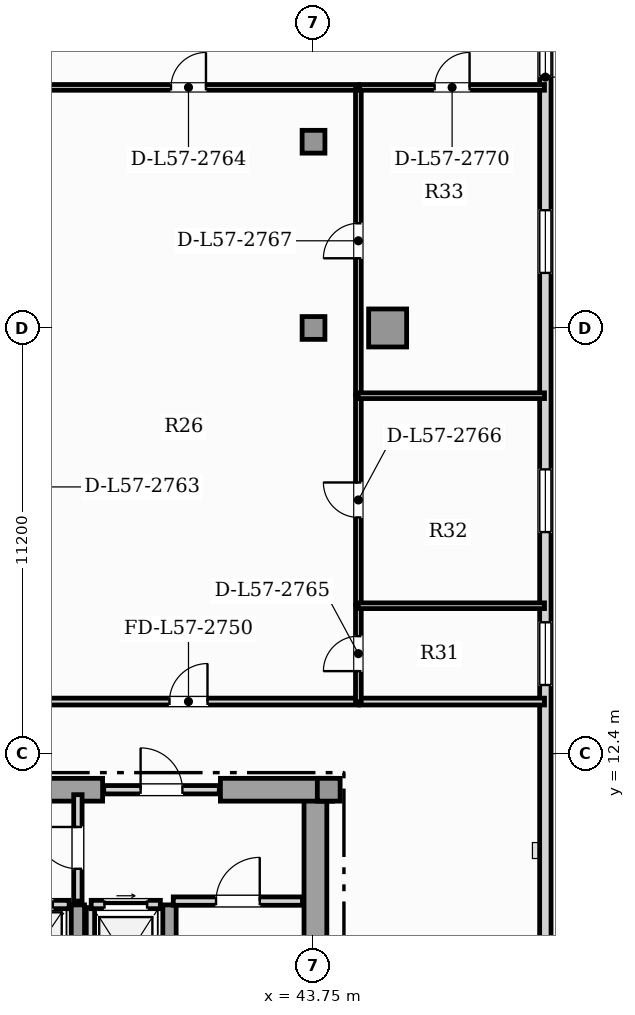
"""IFC4 building model, lengths in metres.
Left out: names, types, materials, properties, quantities, classifications, styles, units other than length and angle.
Written with IfcOpenShell. Run it as: python <this file> out.ifc"""

import sys

from ifc_helpers import new_model, si_unit, direction, frame, frame_2d, origin, origin_2d, place, context, subcontext, project, spatial, rectangle, hollow_rectangle, extrude, element, fill, save


model = new_model("IFC4")
c1 = context("Model", 3, precision=1e-05, world=origin(), true_north=direction((0.0, 1.0)))
c2 = subcontext(c1, "Body", "Model", "MODEL_VIEW")
j1 = project(units=[si_unit("LENGTHUNIT", "METRE"), si_unit("PLANEANGLEUNIT", "RADIAN")], contexts=[c1])
p1 = place(None, origin())
s1 = spatial("IfcSite", under=j1, at=p1, CompositionType="ELEMENT")
p2 = place(p1, origin())
s2 = spatial("IfcBuilding", under=s1, at=p2, CompositionType="ELEMENT")
p3 = place(p2, frame((0.0, 0.0, 231.1)))
s3 = spatial("IfcBuildingStorey", under=s2, at=p3, CompositionType="ELEMENT", Elevation=231.1)
p4 = place(p3, frame((43.8, 0.92, 0.0), z_axis=(0.0, 0.0, 1.0), x_axis=(0.0, 1.0, 0.0)))
e1 = element("IfcWall", 1, at=p4, inside=s3, PredefinedType="SHEAR", context=c2, shape_type="SweptSolid", body=[
    extrude(rectangle(XDim=10.53, YDim=0.6, at=frame_2d((5.265, 0.0))), origin(), (0.0, 0.0, 1.0), 3.63),
])
p5 = place(p3, frame((30.9, 11.45, 0.0), z_axis=(0.0, 0.0, 1.0), x_axis=(1.0, 0.0, 0.0)))
e2 = element("IfcWall", 2, at=p5, inside=s3, PredefinedType="SHEAR", context=c2, shape_type="SweptSolid", body=[
    extrude(rectangle(XDim=7.3, YDim=0.6, at=frame_2d((3.65, 0.0))), origin(), (0.0, 0.0, 1.0), 3.63),
])
p6 = place(p3, frame((41.3, 11.45, 0.0), z_axis=(0.0, 0.0, 1.0), x_axis=(1.0, 0.0, 0.0)))
e3 = element("IfcWall", 3, at=p6, inside=s3, PredefinedType="SHEAR", context=c2, shape_type="SweptSolid", body=[
    extrude(rectangle(XDim=2.95, YDim=0.6, at=frame_2d((1.475, 0.0))), origin(), (0.0, 0.0, 1.0), 3.63),
])
for number, where, z_axis, x_axis in (
    (4, (37.55, 0.92, 0.0), (0.0, 0.0, 1.0), (0.0, 1.0, 0.0)),
    (5, (39.96, 0.92, 0.0), (0.0, 0.0, 1.0), (0.0, 1.0, 0.0)),
):
    element("IfcWall", number, at=place(p3, frame(where, z_axis=z_axis, x_axis=x_axis)), inside=s3, PredefinedType="SHEAR", context=c2, shape_type="SweptSolid", body=[
        extrude(rectangle(XDim=7.5, YDim=0.35, at=frame_2d((3.75, 0.0))), origin(), (0.0, 0.0, 1.0), 3.63),
    ])
p7 = place(p3, frame((44.15, 11.45, 0.0), z_axis=(0.0, 0.0, 1.0), x_axis=(1.0, 0.0, 0.0)))
e6 = element("IfcColumn", 6, at=p7, inside=s3, PredefinedType="COLUMN", context=c2, shape_type="SweptSolid", body=[
    extrude(rectangle(XDim=0.6, YDim=0.6, at=origin_2d()), origin(), (0.0, 0.0, 1.0), 3.85),
])
p8 = place(p3, frame((45.7, 23.6, 0.0), z_axis=(0.0, 0.0, 1.0), x_axis=(1.0, 0.0, 0.0)))
e7 = element("IfcColumn", 7, at=p8, inside=s3, PredefinedType="USERDEFINED", context=c2, shape_type="SweptSolid", body=[
    extrude(hollow_rectangle(XDim=1.0, YDim=1.0, WallThickness=0.06, at=origin_2d()), origin(), (0.0, 0.0, 1.0), 3.85),
])
for number, where, z_axis, x_axis in (
    (8, (43.75, 23.6, 0.0), (0.0, 0.0, 1.0), (1.0, 0.0, 0.0)),
    (9, (43.75, 28.5, 0.0), (0.0, 0.0, 1.0), (1.0, 0.0, 0.0)),
):
    element("IfcColumn", number, at=place(p3, frame(where, z_axis=z_axis, x_axis=x_axis)), inside=s3, PredefinedType="COLUMN", context=c2, shape_type="SweptSolid", body=[
        extrude(rectangle(XDim=0.6, YDim=0.6, at=origin_2d()), origin(), (0.0, 0.0, 1.0), 3.85),
    ])
p9 = place(p3, frame((49.85, 3.24, 0.0), z_axis=(0.0, 0.0, 1.0), x_axis=(0.0, 1.0, 0.0)))
e10 = element("IfcWall", 10, at=p9, inside=s3, PredefinedType="SOLIDWALL", context=c2, shape_type="SweptSolid", body=[
    extrude(rectangle(XDim=30.72, YDim=0.3, at=frame_2d((15.36, 0.0))), origin(), (0.0, 0.0, 1.0), 3.63),
])
p10 = place(p9, frame((26.99, 0.0, 0.95)))
e11 = element("IfcOpeningElement", 11, at=p10, cuts=e10, PredefinedType="OPENING", context=c2, shape_type="SweptSolid", body=[
    extrude(rectangle(XDim=0.9, YDim=1.5, at=frame_2d((0.45, 0.75))), frame((0.0, 0.16, 0.0), z_axis=(0.0, -1.0, 0.0), x_axis=(1.0, 0.0, 0.0)), (0.0, 0.0, 1.0), 0.32),
])
p11 = place(p9, frame((10.966, 0.0, 0.88)))
e12 = element("IfcOpeningElement", 12, at=p11, cuts=e10, PredefinedType="OPENING", context=c2, shape_type="SweptSolid", body=[
    extrude(rectangle(XDim=1.65, YDim=2.0, at=frame_2d((0.825, 1.0))), frame((0.0, 0.16, 0.0), z_axis=(0.0, -1.0, 0.0), x_axis=(1.0, 0.0, 0.0)), (0.0, 0.0, 1.0), 0.32),
])
p12 = place(p9, frame((14.99, 0.0, 0.88)))
e13 = element("IfcOpeningElement", 13, at=p12, cuts=e10, PredefinedType="OPENING", context=c2, shape_type="SweptSolid", body=[
    extrude(rectangle(XDim=1.65, YDim=2.0, at=frame_2d((0.825, 1.0))), frame((0.0, 0.16, 0.0), z_axis=(0.0, -1.0, 0.0), x_axis=(1.0, 0.0, 0.0)), (0.0, 0.0, 1.0), 0.32),
])
p13 = place(p9, frame((21.809, 0.0, 0.88)))
e14 = element("IfcOpeningElement", 14, at=p13, cuts=e10, PredefinedType="OPENING", context=c2, shape_type="SweptSolid", body=[
    extrude(rectangle(XDim=1.65, YDim=2.0, at=frame_2d((0.825, 1.0))), frame((0.0, 0.16, 0.0), z_axis=(0.0, -1.0, 0.0), x_axis=(1.0, 0.0, 0.0)), (0.0, 0.0, 1.0), 0.32),
])
p14 = place(p9, frame((29.04, 0.0, 0.95)))
e15 = element("IfcOpeningElement", 15, at=p14, cuts=e10, PredefinedType="OPENING", context=c2, shape_type="SweptSolid", body=[
    extrude(rectangle(XDim=0.9, YDim=1.5, at=frame_2d((0.45, 0.75))), frame((0.0, 0.16, 0.0), z_axis=(0.0, -1.0, 0.0), x_axis=(1.0, 0.0, 0.0)), (0.0, 0.0, 1.0), 0.32),
])
p15 = place(p3, frame((37.88, 5.65, 0.0), z_axis=(0.0, 0.0, 1.0), x_axis=(0.0, 1.0, 0.0)))
e16 = element("IfcWall", 16, at=p15, inside=s3, PredefinedType="SOLIDWALL", context=c2, shape_type="SweptSolid", body=[
    extrude(rectangle(XDim=2.7, YDim=0.22, at=frame_2d((1.35, 0.0))), origin(), (0.0, 0.0, 1.0), 3.63),
])
p16 = place(p3, frame((37.9, 8.43, 0.0), z_axis=(0.0, 0.0, 1.0), x_axis=(1.0, 0.0, 0.0)))
e17 = element("IfcWall", 17, at=p16, inside=s3, PredefinedType="SOLIDWALL", context=c2, shape_type="SweptSolid", body=[
    extrude(rectangle(XDim=1.82, YDim=0.22, at=frame_2d((0.91, 0.0))), origin(), (0.0, 0.0, 1.0), 3.63),
])
p17 = place(p16, frame((0.35, 0.0, 0.0)))
e18 = element("IfcOpeningElement", 18, at=p17, cuts=e17, PredefinedType="OPENING", context=c2, shape_type="SweptSolid", body=[
    extrude(rectangle(XDim=1.12, YDim=2.25, at=frame_2d((0.56, 1.125))), frame((0.0, 0.12, 0.0), z_axis=(0.0, -1.0, 0.0), x_axis=(1.0, 0.0, 0.0)), (0.0, 0.0, 1.0), 0.24),
])
p18 = place(p3, frame((35.28, 8.43, 0.0), z_axis=(0.0, 0.0, 1.0), x_axis=(1.0, 0.0, 0.0)))
e19 = element("IfcWall", 19, at=p18, inside=s3, PredefinedType="SOLIDWALL", context=c2, shape_type="SweptSolid", body=[
    extrude(rectangle(XDim=2.04, YDim=0.22, at=frame_2d((1.02, 0.0))), origin(), (0.0, 0.0, 1.0), 3.63),
])
p19 = place(p18, frame((0.43, 0.0, 0.0)))
e20 = element("IfcOpeningElement", 20, at=p19, cuts=e19, PredefinedType="OPENING", context=c2, shape_type="SweptSolid", body=[
    extrude(rectangle(XDim=1.18, YDim=2.2, at=frame_2d((0.59, 1.1))), frame((0.0, 0.12, 0.0), z_axis=(0.0, -1.0, 0.0), x_axis=(1.0, 0.0, 0.0)), (0.0, 0.0, 1.0), 0.24),
])
p20 = place(p3, frame((40.06, 8.52, 0.0), z_axis=(0.0, 0.0, 1.0), x_axis=(1.0, 0.0, 0.0)))
e21 = element("IfcWall", 21, at=p20, inside=s3, PredefinedType="SOLIDWALL", context=c2, shape_type="SweptSolid", body=[
    extrude(rectangle(XDim=3.4, YDim=0.22, at=frame_2d((1.7, 0.0))), origin(), (0.0, 0.0, 1.0), 3.63),
])
p21 = place(p20, frame((1.125, 0.0, 0.0)))
e22 = element("IfcOpeningElement", 22, at=p21, cuts=e21, PredefinedType="OPENING", context=c2, shape_type="SweptSolid", body=[
    extrude(rectangle(XDim=1.15, YDim=2.2, at=frame_2d((0.575, 1.1))), frame((0.0, 0.12, 0.0), z_axis=(0.0, -1.0, 0.0), x_axis=(1.0, 0.0, 0.0)), (0.0, 0.0, 1.0), 0.24),
])
p22 = place(p3, frame((37.55, 8.52, 0.0), z_axis=(0.0, 0.0, 1.0), x_axis=(0.0, 1.0, 0.0)))
e23 = element("IfcWall", 23, at=p22, inside=s3, PredefinedType="SOLIDWALL", context=c2, shape_type="SweptSolid", body=[
    extrude(rectangle(XDim=2.8, YDim=0.22, at=frame_2d((1.4, 0.0))), origin(), (0.0, 0.0, 1.0), 3.085),
])
p23 = place(p22, frame((0.85, 0.0, 0.0)))
e24 = element("IfcOpeningElement", 24, at=p23, cuts=e23, PredefinedType="OPENING", context=c2, shape_type="SweptSolid", body=[
    extrude(rectangle(XDim=1.1, YDim=2.2, at=frame_2d((0.55, 1.1))), frame((0.0, 0.12, 0.0), z_axis=(0.0, -1.0, 0.0), x_axis=(1.0, 0.0, 0.0)), (0.0, 0.0, 1.0), 0.24),
])
p24 = place(p3, frame((38.23, 11.45, 0.0), z_axis=(0.0, 0.0, 1.0), x_axis=(1.0, 0.0, 0.0)))
e25 = element("IfcWall", 25, at=p24, inside=s3, PredefinedType="SOLIDWALL", context=c2, shape_type="SweptSolid", body=[
    extrude(rectangle(XDim=3.04, YDim=0.22, at=frame_2d((1.52, 0.0))), origin(), (0.0, 0.0, 1.0), 3.63),
])
p25 = place(p24, frame((0.97, 0.0, 0.0)))
e26 = element("IfcOpeningElement", 26, at=p25, cuts=e25, PredefinedType="OPENING", context=c2, shape_type="SweptSolid", body=[
    extrude(rectangle(XDim=1.1, YDim=2.2, at=frame_2d((0.55, 1.1))), frame((0.0, 0.12, 0.0), z_axis=(0.0, -1.0, 0.0), x_axis=(1.0, 0.0, 0.0)), (0.0, 0.0, 1.0), 0.24),
])
p26 = place(p3, frame((35.985, 13.77, 0.0), z_axis=(0.0, 0.0, 1.0), x_axis=(1.0, 0.0, 0.0)))
e27 = element("IfcWall", 27, at=p26, inside=s3, PredefinedType="PARTITIONING", context=c2, shape_type="SweptSolid", body=[
    extrude(rectangle(XDim=8.95, YDim=0.18, at=frame_2d((4.475, 0.0))), origin(), (0.0, 0.0, 1.0), 3.63),
])
p27 = place(p26, frame((3.975, 0.0, 0.0)))
e28 = element("IfcOpeningElement", 28, at=p27, cuts=e27, PredefinedType="OPENING", context=c2, shape_type="SweptSolid", body=[
    extrude(rectangle(XDim=1.0, YDim=2.15, at=frame_2d((0.5, 1.075))), frame((0.0, 0.1, 0.0), z_axis=(0.0, -1.0, 0.0), x_axis=(1.0, 0.0, 0.0)), (0.0, 0.0, 1.0), 0.2),
])
p28 = place(p3, frame((44.965, 13.77, 0.0), z_axis=(0.0, 0.0, 1.0), x_axis=(1.0, 0.0, 0.0)))
e29 = element("IfcWall", 29, at=p28, inside=s3, PredefinedType="PARTITIONING", context=c2, shape_type="SweptSolid", body=[
    extrude(rectangle(XDim=4.862, YDim=0.18, at=frame_2d((2.431, 0.0))), origin(), (0.0, 0.0, 1.0), 3.63),
])
p29 = place(p3, frame((35.985, 29.93, 0.0), z_axis=(0.0, 0.0, 1.0), x_axis=(1.0, 0.0, 0.0)))
e30 = element("IfcWall", 30, at=p29, inside=s3, PredefinedType="PARTITIONING", context=c2, shape_type="SweptSolid", body=[
    extrude(rectangle(XDim=8.95, YDim=0.15, at=frame_2d((4.475, 0.0))), origin(), (0.0, 0.0, 1.0), 3.63),
])
p30 = place(p29, frame((4.015, 0.0, 0.0)))
e31 = element("IfcOpeningElement", 31, at=p30, cuts=e30, PredefinedType="OPENING", context=c2, shape_type="SweptSolid", body=[
    extrude(rectangle(XDim=0.92, YDim=2.1, at=frame_2d((0.46, 1.05))), frame((0.0, 0.085, 0.0), z_axis=(0.0, -1.0, 0.0), x_axis=(1.0, 0.0, 0.0)), (0.0, 0.0, 1.0), 0.17),
])
p31 = place(p3, frame((44.93, 13.765, 0.0), z_axis=(0.0, 0.0, 1.0), x_axis=(0.0, 1.0, 0.0)))
e32 = element("IfcWall", 32, at=p31, inside=s3, PredefinedType="PARTITIONING", context=c2, shape_type="SweptSolid", body=[
    extrude(rectangle(XDim=2.531, YDim=0.15, at=frame_2d((1.266, 0.0))), origin(), (0.0, 0.0, 1.0), 3.63),
])
p32 = place(p31, frame((0.806, 0.0, 0.0)))
e33 = element("IfcOpeningElement", 33, at=p32, cuts=e32, PredefinedType="OPENING", context=c2, shape_type="SweptSolid", body=[
    extrude(rectangle(XDim=0.92, YDim=2.1, at=frame_2d((0.46, 1.05))), frame((0.0, 0.085, 0.0), z_axis=(0.0, -1.0, 0.0), x_axis=(1.0, 0.0, 0.0)), (0.0, 0.0, 1.0), 0.17),
])
p33 = place(p3, frame((44.93, 16.326, 0.0), z_axis=(0.0, 0.0, 1.0), x_axis=(0.0, 1.0, 0.0)))
e34 = element("IfcWall", 34, at=p33, inside=s3, PredefinedType="PARTITIONING", context=c2, shape_type="SweptSolid", body=[
    extrude(rectangle(XDim=5.496, YDim=0.15, at=frame_2d((2.748, 0.0))), origin(), (0.0, 0.0, 1.0), 3.63),
])
p34 = place(p33, frame((2.288, 0.0, 0.0)))
e35 = element("IfcOpeningElement", 35, at=p34, cuts=e34, PredefinedType="OPENING", context=c2, shape_type="SweptSolid", body=[
    extrude(rectangle(XDim=0.92, YDim=2.1, at=frame_2d((0.46, 1.05))), frame((0.0, 0.085, 0.0), z_axis=(0.0, -1.0, 0.0), x_axis=(1.0, 0.0, 0.0)), (0.0, 0.0, 1.0), 0.17),
])
p35 = place(p3, frame((44.93, 21.853, 0.0), z_axis=(0.0, 0.0, 1.0), x_axis=(0.0, 1.0, 0.0)))
e36 = element("IfcWall", 36, at=p35, inside=s3, PredefinedType="PARTITIONING", context=c2, shape_type="SweptSolid", body=[
    extrude(rectangle(XDim=8.083, YDim=0.15, at=frame_2d((4.041, 0.0))), origin(), (0.0, 0.0, 1.0), 3.63),
])
p36 = place(p35, frame((3.581, 0.0, 0.0)))
e37 = element("IfcOpeningElement", 37, at=p36, cuts=e36, PredefinedType="OPENING", context=c2, shape_type="SweptSolid", body=[
    extrude(rectangle(XDim=0.92, YDim=2.1, at=frame_2d((0.46, 1.05))), frame((0.0, 0.085, 0.0), z_axis=(0.0, -1.0, 0.0), x_axis=(1.0, 0.0, 0.0)), (0.0, 0.0, 1.0), 0.17),
])
p37 = place(p3, frame((44.965, 29.93, 0.0), z_axis=(0.0, 0.0, 1.0), x_axis=(1.0, 0.0, 0.0)))
e38 = element("IfcWall", 38, at=p37, inside=s3, PredefinedType="PARTITIONING", context=c2, shape_type="SweptSolid", body=[
    extrude(rectangle(XDim=4.862, YDim=0.15, at=frame_2d((2.431, 0.0))), origin(), (0.0, 0.0, 1.0), 3.63),
])
p38 = place(p37, frame((1.971, 0.0, 0.0)))
e39 = element("IfcOpeningElement", 39, at=p38, cuts=e38, PredefinedType="OPENING", context=c2, shape_type="SweptSolid", body=[
    extrude(rectangle(XDim=0.92, YDim=2.1, at=frame_2d((0.46, 1.05))), frame((0.0, 0.085, 0.0), z_axis=(0.0, -1.0, 0.0), x_axis=(1.0, 0.0, 0.0)), (0.0, 0.0, 1.0), 0.17),
])
for number, where, z_axis, x_axis in (
    (40, (44.925, 16.292, 0.0), (0.0, 0.0, 1.0), (1.0, 0.0, 0.0)),
    (41, (44.925, 21.817, 0.0), (0.0, 0.0, 1.0), (1.0, 0.0, 0.0)),
):
    element("IfcWall", number, at=place(p3, frame(where, z_axis=z_axis, x_axis=x_axis)), inside=s3, PredefinedType="PARTITIONING", context=c2, shape_type="SweptSolid", body=[
        extrude(rectangle(XDim=4.902, YDim=0.15, at=frame_2d((2.451, 0.0))), origin(), (0.0, 0.0, 1.0), 3.63),
    ])
p39 = place(p10, origin())
e42 = element("IfcWindow", 42, at=p39, inside=s3, PartitioningType="SINGLE_PANEL", PredefinedType="WINDOW", context=c2, shape_type="SweptSolid", body=[
    extrude(rectangle(XDim=0.9, YDim=1.5, at=frame_2d((0.45, 0.75))), frame((0.0, 0.03, 0.0), z_axis=(0.0, -1.0, 0.0), x_axis=(1.0, 0.0, 0.0)), (0.0, 0.0, 1.0), 0.06),
])
fill(e11, e42)
p40 = place(p11, origin())
e43 = element("IfcWindow", 43, at=p40, inside=s3, PartitioningType="SINGLE_PANEL", PredefinedType="WINDOW", context=c2, shape_type="SweptSolid", body=[
    extrude(rectangle(XDim=1.65, YDim=2.0, at=frame_2d((0.825, 1.0))), frame((0.0, 0.03, 0.0), z_axis=(0.0, -1.0, 0.0), x_axis=(1.0, 0.0, 0.0)), (0.0, 0.0, 1.0), 0.06),
])
fill(e12, e43)
p41 = place(p12, origin())
e44 = element("IfcWindow", 44, at=p41, inside=s3, PartitioningType="SINGLE_PANEL", PredefinedType="WINDOW", context=c2, shape_type="SweptSolid", body=[
    extrude(rectangle(XDim=1.65, YDim=2.0, at=frame_2d((0.825, 1.0))), frame((0.0, 0.03, 0.0), z_axis=(0.0, -1.0, 0.0), x_axis=(1.0, 0.0, 0.0)), (0.0, 0.0, 1.0), 0.06),
])
fill(e13, e44)
p42 = place(p13, origin())
e45 = element("IfcWindow", 45, at=p42, inside=s3, PartitioningType="SINGLE_PANEL", PredefinedType="WINDOW", context=c2, shape_type="SweptSolid", body=[
    extrude(rectangle(XDim=1.65, YDim=2.0, at=frame_2d((0.825, 1.0))), frame((0.0, 0.03, 0.0), z_axis=(0.0, -1.0, 0.0), x_axis=(1.0, 0.0, 0.0)), (0.0, 0.0, 1.0), 0.06),
])
fill(e14, e45)
p43 = place(p17, origin())
e46 = element("IfcDoor", 46, at=p43, inside=s3, OperationType="SLIDING_TO_RIGHT", PredefinedType="DOOR", context=c2, shape_type="SweptSolid", body=[
    extrude(rectangle(XDim=1.12, YDim=2.25, at=frame_2d((0.56, 1.125))), frame((0.0, 0.025, 0.0), z_axis=(0.0, -1.0, 0.0), x_axis=(1.0, 0.0, 0.0)), (0.0, 0.0, 1.0), 0.05),
])
fill(e18, e46)
p44 = place(p19, origin())
e47 = element("IfcDoor", 47, at=p44, inside=s3, OperationType="SLIDING_TO_LEFT", PredefinedType="DOOR", context=c2, shape_type="SweptSolid", body=[
    extrude(rectangle(XDim=1.18, YDim=2.2, at=frame_2d((0.59, 1.1))), frame((0.0, 0.025, 0.0), z_axis=(0.0, -1.0, 0.0), x_axis=(1.0, 0.0, 0.0)), (0.0, 0.0, 1.0), 0.05),
])
fill(e20, e47)
p45 = place(p21, origin())
e48 = element("IfcDoor", 48, at=p45, inside=s3, OperationType="SINGLE_SWING_RIGHT", PredefinedType="DOOR", context=c2, shape_type="SweptSolid", body=[
    extrude(rectangle(XDim=1.15, YDim=2.2, at=frame_2d((0.575, 1.1))), frame((0.0, 0.025, 0.0), z_axis=(0.0, -1.0, 0.0), x_axis=(1.0, 0.0, 0.0)), (0.0, 0.0, 1.0), 0.05),
])
fill(e22, e48)
p46 = place(p23, origin())
e49 = element("IfcDoor", 49, at=p46, inside=s3, OperationType="SINGLE_SWING_RIGHT", PredefinedType="DOOR", context=c2, shape_type="SweptSolid", body=[
    extrude(rectangle(XDim=1.1, YDim=2.2, at=frame_2d((0.55, 1.1))), frame((0.0, 0.025, 0.0), z_axis=(0.0, -1.0, 0.0), x_axis=(1.0, 0.0, 0.0)), (0.0, 0.0, 1.0), 0.05),
])
fill(e24, e49)
p47 = place(p25, origin())
e50 = element("IfcDoor", 50, at=p47, inside=s3, OperationType="SINGLE_SWING_LEFT", PredefinedType="DOOR", context=c2, shape_type="SweptSolid", body=[
    extrude(rectangle(XDim=1.1, YDim=2.2, at=frame_2d((0.55, 1.1))), frame((0.0, 0.025, 0.0), z_axis=(0.0, -1.0, 0.0), x_axis=(1.0, 0.0, 0.0)), (0.0, 0.0, 1.0), 0.05),
])
fill(e26, e50)
p48 = place(p27, origin())
e51 = element("IfcDoor", 51, at=p48, inside=s3, OperationType="SINGLE_SWING_RIGHT", PredefinedType="DOOR", context=c2, shape_type="SweptSolid", body=[
    extrude(rectangle(XDim=1.0, YDim=2.15, at=frame_2d((0.5, 1.075))), frame((0.0, 0.025, 0.0), z_axis=(0.0, -1.0, 0.0), x_axis=(1.0, 0.0, 0.0)), (0.0, 0.0, 1.0), 0.05),
])
fill(e28, e51)
p49 = place(p30, origin())
e52 = element("IfcDoor", 52, at=p49, inside=s3, OperationType="SINGLE_SWING_RIGHT", PredefinedType="DOOR", context=c2, shape_type="SweptSolid", body=[
    extrude(rectangle(XDim=0.92, YDim=2.1, at=frame_2d((0.46, 1.05))), frame((0.0, 0.025, 0.0), z_axis=(0.0, -1.0, 0.0), x_axis=(1.0, 0.0, 0.0)), (0.0, 0.0, 1.0), 0.05),
])
fill(e31, e52)
p50 = place(p32, origin())
e53 = element("IfcDoor", 53, at=p50, inside=s3, OperationType="SINGLE_SWING_LEFT", PredefinedType="DOOR", context=c2, shape_type="SweptSolid", body=[
    extrude(rectangle(XDim=0.92, YDim=2.1, at=frame_2d((0.46, 1.05))), frame((0.0, 0.025, 0.0), z_axis=(0.0, -1.0, 0.0), x_axis=(1.0, 0.0, 0.0)), (0.0, 0.0, 1.0), 0.05),
])
fill(e33, e53)
p51 = place(p34, origin())
e54 = element("IfcDoor", 54, at=p51, inside=s3, OperationType="SINGLE_SWING_RIGHT", PredefinedType="DOOR", context=c2, shape_type="SweptSolid", body=[
    extrude(rectangle(XDim=0.92, YDim=2.1, at=frame_2d((0.46, 1.05))), frame((0.0, 0.025, 0.0), z_axis=(0.0, -1.0, 0.0), x_axis=(1.0, 0.0, 0.0)), (0.0, 0.0, 1.0), 0.05),
])
fill(e35, e54)
p52 = place(p36, origin())
e55 = element("IfcDoor", 55, at=p52, inside=s3, OperationType="SINGLE_SWING_LEFT", PredefinedType="DOOR", context=c2, shape_type="SweptSolid", body=[
    extrude(rectangle(XDim=0.92, YDim=2.1, at=frame_2d((0.46, 1.05))), frame((0.0, 0.025, 0.0), z_axis=(0.0, -1.0, 0.0), x_axis=(1.0, 0.0, 0.0)), (0.0, 0.0, 1.0), 0.05),
])
fill(e37, e55)
p53 = place(p38, origin())
e56 = element("IfcDoor", 56, at=p53, inside=s3, OperationType="SINGLE_SWING_RIGHT", PredefinedType="DOOR", context=c2, shape_type="SweptSolid", body=[
    extrude(rectangle(XDim=0.92, YDim=2.1, at=frame_2d((0.46, 1.05))), frame((0.0, 0.025, 0.0), z_axis=(0.0, -1.0, 0.0), x_axis=(1.0, 0.0, 0.0)), (0.0, 0.0, 1.0), 0.05),
])
fill(e39, e56)
save(model, sys.argv[1])
